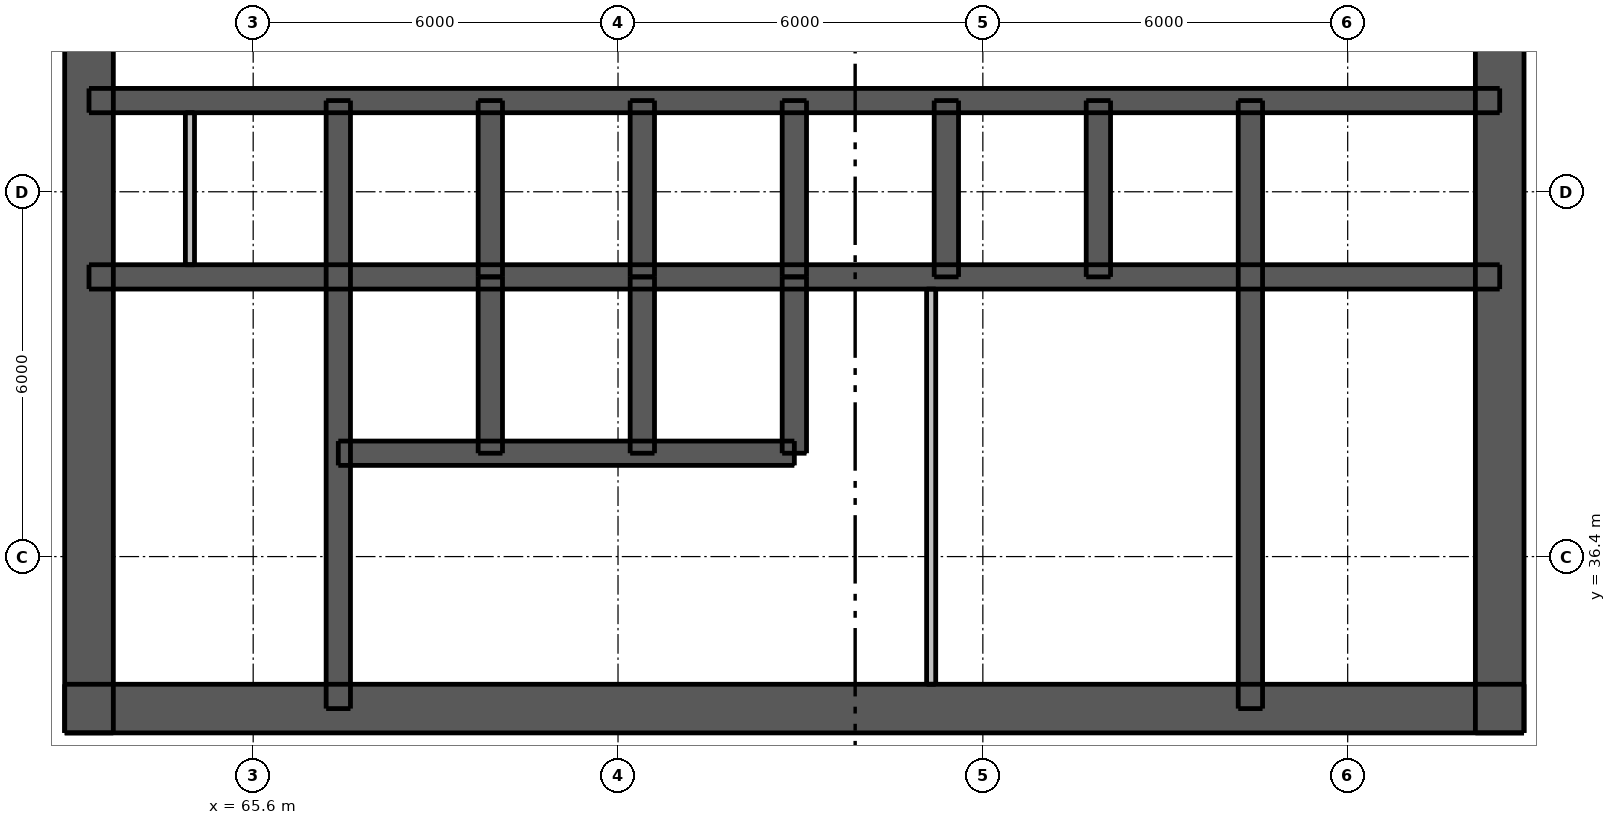
"""IFC4 building model, lengths in metres.
Left out: names, types, materials, properties, quantities, classifications, styles, units other than length and angle.
Written with IfcOpenShell. Run it as: python <this file> out.ifc"""

import sys

from ifc_helpers import new_model, si_unit, direction, frame, frame_2d, origin, place, context, subcontext, project, spatial, rectangle, extrude, element, fill, save


model = new_model("IFC4")
c1 = context("Model", 3, precision=1e-05, world=origin(), true_north=direction((0.0, 1.0)))
c2 = subcontext(c1, "Body", "Model", "MODEL_VIEW")
j1 = project(units=[si_unit("LENGTHUNIT", "METRE"), si_unit("PLANEANGLEUNIT", "RADIAN")], contexts=[c1])
p1 = place(None, origin())
s1 = spatial("IfcSite", under=j1, at=p1, CompositionType="ELEMENT")
p2 = place(p1, origin())
s2 = spatial("IfcBuilding", under=s1, at=p2, CompositionType="ELEMENT")
p3 = place(p2, frame((0.0, 0.0, 108.4)))
s3 = spatial("IfcBuildingStorey", under=s2, at=p3, CompositionType="ELEMENT", Elevation=108.4)
p4 = place(p3, frame((62.5, 33.9, 0.0), z_axis=(0.0, 0.0, 1.0), x_axis=(1.0, 0.0, 0.0)))
e1 = element("IfcWall", 1, at=p4, inside=s3, PredefinedType="SHEAR", context=c2, shape_type="SweptSolid", body=[
    extrude(rectangle(XDim=24.0, YDim=0.8, at=frame_2d((12.0, 0.0))), origin(), (0.0, 0.0, 1.0), 3.05),
])
p5 = place(p4, frame((2.0, 0.0, 0.0)))
e2 = element("IfcOpeningElement", 2, at=p5, cuts=e1, PredefinedType="OPENING", context=c2, shape_type="SweptSolid", body=[
    extrude(rectangle(XDim=1.1, YDim=2.1, at=frame_2d((0.55, 1.05))), frame((0.0, 0.41, 0.0), z_axis=(0.0, -1.0, 0.0), x_axis=(1.0, 0.0, 0.0)), (0.0, 0.0, 1.0), 0.82),
])
p6 = place(p4, frame((20.9, 0.0, 0.0)))
e3 = element("IfcOpeningElement", 3, at=p6, cuts=e1, PredefinedType="OPENING", context=c2, shape_type="SweptSolid", body=[
    extrude(rectangle(XDim=1.1, YDim=2.1, at=frame_2d((0.55, 1.05))), frame((0.0, 0.41, 0.0), z_axis=(0.0, -1.0, 0.0), x_axis=(1.0, 0.0, 0.0)), (0.0, 0.0, 1.0), 0.82),
])
p7 = place(p4, frame((8.0, 0.0, 0.0)))
e4 = element("IfcOpeningElement", 4, at=p7, cuts=e1, PredefinedType="OPENING", context=c2, shape_type="SweptSolid", body=[
    extrude(rectangle(XDim=1.1, YDim=2.1, at=frame_2d((0.55, 1.05))), frame((0.0, 0.41, 0.0), z_axis=(0.0, -1.0, 0.0), x_axis=(1.0, 0.0, 0.0)), (0.0, 0.0, 1.0), 0.82),
])
p8 = place(p4, frame((16.363, 0.0, 0.0)))
e5 = element("IfcOpeningElement", 5, at=p8, cuts=e1, PredefinedType="OPENING", context=c2, shape_type="SweptSolid", body=[
    extrude(rectangle(XDim=0.9, YDim=2.1, at=frame_2d((0.45, 1.05))), frame((0.0, 0.41, 0.0), z_axis=(0.0, -1.0, 0.0), x_axis=(1.0, 0.0, 0.0)), (0.0, 0.0, 1.0), 0.82),
])
p9 = place(p3, frame((62.9, 33.5, 0.0), z_axis=(0.0, 0.0, 1.0), x_axis=(0.0, 1.0, 0.0)))
e6 = element("IfcWall", 6, at=p9, inside=s3, PredefinedType="SHEAR", context=c2, shape_type="SweptSolid", body=[
    extrude(rectangle(XDim=24.0, YDim=0.8, at=frame_2d((12.0, 0.0))), origin(), (0.0, 0.0, 1.0), 3.05),
])
p10 = place(p9, frame((11.2, 0.0, 0.0)))
e7 = element("IfcOpeningElement", 7, at=p10, cuts=e6, PredefinedType="OPENING", context=c2, shape_type="SweptSolid", body=[
    extrude(rectangle(XDim=1.6, YDim=2.1, at=frame_2d((0.8, 1.05))), frame((0.0, 0.41, 0.0), z_axis=(0.0, -1.0, 0.0), x_axis=(1.0, 0.0, 0.0)), (0.0, 0.0, 1.0), 0.82),
])
p11 = place(p3, frame((86.1, 33.5, 0.0), z_axis=(0.0, 0.0, 1.0), x_axis=(0.0, 1.0, 0.0)))
e8 = element("IfcWall", 8, at=p11, inside=s3, PredefinedType="SHEAR", context=c2, shape_type="SweptSolid", body=[
    extrude(rectangle(XDim=24.0, YDim=0.8, at=frame_2d((12.0, 0.0))), origin(), (0.0, 0.0, 1.0), 3.05),
])
p12 = place(p11, frame((11.2, 0.0, 0.0)))
e9 = element("IfcOpeningElement", 9, at=p12, cuts=e8, PredefinedType="OPENING", context=c2, shape_type="SweptSolid", body=[
    extrude(rectangle(XDim=1.6, YDim=2.1, at=frame_2d((0.8, 1.05))), frame((0.0, 0.41, 0.0), z_axis=(0.0, -1.0, 0.0), x_axis=(1.0, 0.0, 0.0)), (0.0, 0.0, 1.0), 0.82),
])
p13 = place(p3, frame((62.9, 41.0, 0.0), z_axis=(0.0, 0.0, 1.0), x_axis=(1.0, 0.0, 0.0)))
e10 = element("IfcWall", 10, at=p13, inside=s3, PredefinedType="SHEAR", context=c2, shape_type="SweptSolid", body=[
    extrude(rectangle(XDim=23.2, YDim=0.4, at=frame_2d((11.6, 0.0))), origin(), (0.0, 0.0, 1.0), 3.05),
])
p14 = place(p3, frame((62.9, 43.9, 0.0), z_axis=(0.0, 0.0, 1.0), x_axis=(1.0, 0.0, 0.0)))
e11 = element("IfcWall", 11, at=p14, inside=s3, PredefinedType="SHEAR", context=c2, shape_type="SweptSolid", body=[
    extrude(rectangle(XDim=23.2, YDim=0.4, at=frame_2d((11.6, 0.0))), origin(), (0.0, 0.0, 1.0), 3.05),
])
p15 = place(p14, frame((0.63, 0.0, 0.0)))
e12 = element("IfcOpeningElement", 12, at=p15, cuts=e11, PredefinedType="OPENING", context=c2, shape_type="SweptSolid", body=[
    extrude(rectangle(XDim=0.8, YDim=2.1, at=frame_2d((0.4, 1.05))), frame((0.0, 0.21, 0.0), z_axis=(0.0, -1.0, 0.0), x_axis=(1.0, 0.0, 0.0)), (0.0, 0.0, 1.0), 0.42),
])
p16 = place(p14, frame((2.33, 0.0, 0.0)))
e13 = element("IfcOpeningElement", 13, at=p16, cuts=e11, PredefinedType="OPENING", context=c2, shape_type="SweptSolid", body=[
    extrude(rectangle(XDim=0.9, YDim=2.1, at=frame_2d((0.45, 1.05))), frame((0.0, 0.21, 0.0), z_axis=(0.0, -1.0, 0.0), x_axis=(1.0, 0.0, 0.0)), (0.0, 0.0, 1.0), 0.42),
])
p17 = place(p14, frame((20.6, 0.0, 0.0)))
e14 = element("IfcOpeningElement", 14, at=p17, cuts=e11, PredefinedType="OPENING", context=c2, shape_type="SweptSolid", body=[
    extrude(rectangle(XDim=0.9, YDim=2.1, at=frame_2d((0.45, 1.05))), frame((0.0, 0.21, 0.0), z_axis=(0.0, -1.0, 0.0), x_axis=(1.0, 0.0, 0.0)), (0.0, 0.0, 1.0), 0.42),
])
p18 = place(p14, frame((4.8, 0.0, 0.0)))
e15 = element("IfcOpeningElement", 15, at=p18, cuts=e11, PredefinedType="OPENING", context=c2, shape_type="SweptSolid", body=[
    extrude(rectangle(XDim=1.1, YDim=2.1, at=frame_2d((0.55, 1.05))), frame((0.0, 0.21, 0.0), z_axis=(0.0, -1.0, 0.0), x_axis=(1.0, 0.0, 0.0)), (0.0, 0.0, 1.0), 0.42),
])
p19 = place(p14, frame((7.3, 0.0, 0.0)))
e16 = element("IfcOpeningElement", 16, at=p19, cuts=e11, PredefinedType="OPENING", context=c2, shape_type="SweptSolid", body=[
    extrude(rectangle(XDim=1.1, YDim=2.1, at=frame_2d((0.55, 1.05))), frame((0.0, 0.21, 0.0), z_axis=(0.0, -1.0, 0.0), x_axis=(1.0, 0.0, 0.0)), (0.0, 0.0, 1.0), 0.42),
])
p20 = place(p14, frame((9.8, 0.0, 0.0)))
e17 = element("IfcOpeningElement", 17, at=p20, cuts=e11, PredefinedType="OPENING", context=c2, shape_type="SweptSolid", body=[
    extrude(rectangle(XDim=1.1, YDim=2.1, at=frame_2d((0.55, 1.05))), frame((0.0, 0.21, 0.0), z_axis=(0.0, -1.0, 0.0), x_axis=(1.0, 0.0, 0.0)), (0.0, 0.0, 1.0), 0.42),
])
p21 = place(p14, frame((12.3, 0.0, 0.0)))
e18 = element("IfcOpeningElement", 18, at=p21, cuts=e11, PredefinedType="OPENING", context=c2, shape_type="SweptSolid", body=[
    extrude(rectangle(XDim=1.1, YDim=2.1, at=frame_2d((0.55, 1.05))), frame((0.0, 0.21, 0.0), z_axis=(0.0, -1.0, 0.0), x_axis=(1.0, 0.0, 0.0)), (0.0, 0.0, 1.0), 0.42),
])
p22 = place(p14, frame((14.8, 0.0, 0.0)))
e19 = element("IfcOpeningElement", 19, at=p22, cuts=e11, PredefinedType="OPENING", context=c2, shape_type="SweptSolid", body=[
    extrude(rectangle(XDim=1.1, YDim=2.1, at=frame_2d((0.55, 1.05))), frame((0.0, 0.21, 0.0), z_axis=(0.0, -1.0, 0.0), x_axis=(1.0, 0.0, 0.0)), (0.0, 0.0, 1.0), 0.42),
])
p23 = place(p14, frame((17.3, 0.0, 0.0)))
e20 = element("IfcOpeningElement", 20, at=p23, cuts=e11, PredefinedType="OPENING", context=c2, shape_type="SweptSolid", body=[
    extrude(rectangle(XDim=1.1, YDim=2.1, at=frame_2d((0.55, 1.05))), frame((0.0, 0.21, 0.0), z_axis=(0.0, -1.0, 0.0), x_axis=(1.0, 0.0, 0.0)), (0.0, 0.0, 1.0), 0.42),
])
p24 = place(p3, frame((67.0, 33.9, 0.0), z_axis=(0.0, 0.0, 1.0), x_axis=(0.0, 1.0, 0.0)))
e21 = element("IfcWall", 21, at=p24, inside=s3, PredefinedType="SHEAR", context=c2, shape_type="SweptSolid", body=[
    extrude(rectangle(XDim=10.0, YDim=0.4, at=frame_2d((5.0, 0.0))), origin(), (0.0, 0.0, 1.0), 3.05),
])
p25 = place(p24, frame((0.6, 0.0, 0.0)))
e22 = element("IfcOpeningElement", 22, at=p25, cuts=e21, PredefinedType="OPENING", context=c2, shape_type="SweptSolid", body=[
    extrude(rectangle(XDim=1.1, YDim=2.1, at=frame_2d((0.55, 1.05))), frame((0.0, 0.21, 0.0), z_axis=(0.0, -1.0, 0.0), x_axis=(1.0, 0.0, 0.0)), (0.0, 0.0, 1.0), 0.42),
])
p26 = place(p3, frame((82.0, 33.9, 0.0), z_axis=(0.0, 0.0, 1.0), x_axis=(0.0, 1.0, 0.0)))
e23 = element("IfcWall", 23, at=p26, inside=s3, PredefinedType="SHEAR", context=c2, shape_type="SweptSolid", body=[
    extrude(rectangle(XDim=10.0, YDim=0.4, at=frame_2d((5.0, 0.0))), origin(), (0.0, 0.0, 1.0), 3.05),
])
for number, where, z_axis, x_axis in (
    (24, (69.5, 41.0, 0.0), (0.0, 0.0, 1.0), (0.0, 1.0, 0.0)),
    (25, (72.0, 41.0, 0.0), (0.0, 0.0, 1.0), (0.0, 1.0, 0.0)),
    (26, (74.5, 41.0, 0.0), (0.0, 0.0, 1.0), (0.0, 1.0, 0.0)),
    (27, (77.0, 41.0, 0.0), (0.0, 0.0, 1.0), (0.0, 1.0, 0.0)),
    (28, (79.5, 41.0, 0.0), (0.0, 0.0, 1.0), (0.0, 1.0, 0.0)),
):
    element("IfcWall", number, at=place(p3, frame(where, z_axis=z_axis, x_axis=x_axis)), inside=s3, PredefinedType="SHEAR", context=c2, shape_type="SweptSolid", body=[
        extrude(rectangle(XDim=2.9, YDim=0.4, at=frame_2d((1.45, 0.0))), origin(), (0.0, 0.0, 1.0), 3.05),
    ])
p27 = place(p3, frame((67.0, 38.1, 0.0), z_axis=(0.0, 0.0, 1.0), x_axis=(1.0, 0.0, 0.0)))
e29 = element("IfcWall", 29, at=p27, inside=s3, PredefinedType="SHEAR", context=c2, shape_type="SweptSolid", body=[
    extrude(rectangle(XDim=7.5, YDim=0.4, at=frame_2d((3.75, 0.0))), origin(), (0.0, 0.0, 1.0), 3.05),
])
p28 = place(p27, frame((0.7, 0.0, 0.0)))
e30 = element("IfcOpeningElement", 30, at=p28, cuts=e29, PredefinedType="OPENING", context=c2, shape_type="SweptSolid", body=[
    extrude(rectangle(XDim=1.1, YDim=2.1, at=frame_2d((0.55, 1.05))), frame((0.0, 0.21, 0.0), z_axis=(0.0, -1.0, 0.0), x_axis=(1.0, 0.0, 0.0)), (0.0, 0.0, 1.0), 0.42),
])
p29 = place(p27, frame((3.2, 0.0, 0.0)))
e31 = element("IfcOpeningElement", 31, at=p29, cuts=e29, PredefinedType="OPENING", context=c2, shape_type="SweptSolid", body=[
    extrude(rectangle(XDim=1.1, YDim=2.1, at=frame_2d((0.55, 1.05))), frame((0.0, 0.21, 0.0), z_axis=(0.0, -1.0, 0.0), x_axis=(1.0, 0.0, 0.0)), (0.0, 0.0, 1.0), 0.42),
])
p30 = place(p27, frame((5.65, 0.0, 0.0)))
e32 = element("IfcOpeningElement", 32, at=p30, cuts=e29, PredefinedType="OPENING", context=c2, shape_type="SweptSolid", body=[
    extrude(rectangle(XDim=1.2, YDim=2.1, at=frame_2d((0.6, 1.05))), frame((0.0, 0.21, 0.0), z_axis=(0.0, -1.0, 0.0), x_axis=(1.0, 0.0, 0.0)), (0.0, 0.0, 1.0), 0.42),
])
for number, where, z_axis, x_axis in (
    (33, (69.5, 38.1, 0.0), (0.0, 0.0, 1.0), (0.0, 1.0, 0.0)),
    (34, (72.0, 38.1, 0.0), (0.0, 0.0, 1.0), (0.0, 1.0, 0.0)),
    (35, (74.5, 38.1, 0.0), (0.0, 0.0, 1.0), (0.0, 1.0, 0.0)),
):
    element("IfcWall", number, at=place(p3, frame(where, z_axis=z_axis, x_axis=x_axis)), inside=s3, PredefinedType="SHEAR", context=c2, shape_type="SweptSolid", body=[
        extrude(rectangle(XDim=2.9, YDim=0.4, at=frame_2d((1.45, 0.0))), origin(), (0.0, 0.0, 1.0), 3.05),
    ])
p31 = place(p3, frame((76.75, 34.3, 0.0), z_axis=(0.0, 0.0, 1.0), x_axis=(0.0, 1.0, 0.0)))
e36 = element("IfcWall", 36, at=p31, inside=s3, PredefinedType="PLUMBINGWALL", context=c2, shape_type="SweptSolid", body=[
    extrude(rectangle(XDim=6.5, YDim=0.15, at=frame_2d((3.25, 0.0))), origin(), (0.0, 0.0, 1.0), 3.05),
])
p32 = place(p3, frame((64.56, 41.2, 0.0), z_axis=(0.0, 0.0, 1.0), x_axis=(0.0, 1.0, 0.0)))
e37 = element("IfcWall", 37, at=p32, inside=s3, PredefinedType="PLUMBINGWALL", context=c2, shape_type="SweptSolid", body=[
    extrude(rectangle(XDim=2.5, YDim=0.15, at=frame_2d((1.25, 0.0))), origin(), (0.0, 0.0, 1.0), 3.05),
])
p33 = place(p5, origin())
e38 = element("IfcDoor", 38, at=p33, inside=s3, OperationType="SINGLE_SWING_LEFT", PredefinedType="DOOR", context=c2, shape_type="SweptSolid", body=[
    extrude(rectangle(XDim=1.1, YDim=2.1, at=frame_2d((0.55, 1.05))), frame((0.0, 0.388, 0.0), z_axis=(0.0, -1.0, 0.0), x_axis=(1.0, 0.0, 0.0)), (0.0, 0.0, 1.0), 0.05),
])
fill(e2, e38)
p34 = place(p6, origin())
e39 = element("IfcDoor", 39, at=p34, inside=s3, OperationType="SINGLE_SWING_RIGHT", PredefinedType="DOOR", context=c2, shape_type="SweptSolid", body=[
    extrude(rectangle(XDim=1.1, YDim=2.1, at=frame_2d((0.55, 1.05))), frame((0.0, 0.388, 0.0), z_axis=(0.0, -1.0, 0.0), x_axis=(1.0, 0.0, 0.0)), (0.0, 0.0, 1.0), 0.05),
])
fill(e3, e39)
p35 = place(p7, origin())
e40 = element("IfcDoor", 40, at=p35, inside=s3, OperationType="SINGLE_SWING_LEFT", PredefinedType="DOOR", context=c2, shape_type="SweptSolid", body=[
    extrude(rectangle(XDim=1.1, YDim=2.1, at=frame_2d((0.55, 1.05))), frame((0.0, 0.388, 0.0), z_axis=(0.0, -1.0, 0.0), x_axis=(1.0, 0.0, 0.0)), (0.0, 0.0, 1.0), 0.05),
])
fill(e4, e40)
p36 = place(p25, origin())
e41 = element("IfcDoor", 41, at=p36, inside=s3, OperationType="SINGLE_SWING_RIGHT", PredefinedType="DOOR", context=c2, shape_type="SweptSolid", body=[
    extrude(rectangle(XDim=1.1, YDim=2.1, at=frame_2d((0.55, 1.05))), frame((0.0, -0.138, 0.0), z_axis=(0.0, -1.0, 0.0), x_axis=(1.0, 0.0, 0.0)), (0.0, 0.0, 1.0), 0.05),
])
fill(e22, e41)
p37 = place(p8, origin())
e42 = element("IfcDoor", 42, at=p37, inside=s3, OperationType="SINGLE_SWING_LEFT", PredefinedType="DOOR", context=c2, shape_type="SweptSolid", body=[
    extrude(rectangle(XDim=0.9, YDim=2.1, at=frame_2d((0.45, 1.05))), frame((0.0, 0.388, 0.0), z_axis=(0.0, -1.0, 0.0), x_axis=(1.0, 0.0, 0.0)), (0.0, 0.0, 1.0), 0.05),
])
fill(e5, e42)
p38 = place(p15, origin())
e43 = element("IfcDoor", 43, at=p38, inside=s3, OperationType="SINGLE_SWING_LEFT", PredefinedType="DOOR", context=c2, shape_type="SweptSolid", body=[
    extrude(rectangle(XDim=0.8, YDim=2.1, at=frame_2d((0.4, 1.05))), frame((0.0, -0.138, 0.0), z_axis=(0.0, -1.0, 0.0), x_axis=(1.0, 0.0, 0.0)), (0.0, 0.0, 1.0), 0.05),
])
fill(e12, e43)
p39 = place(p16, origin())
e44 = element("IfcDoor", 44, at=p39, inside=s3, OperationType="SINGLE_SWING_RIGHT", PredefinedType="DOOR", context=c2, shape_type="SweptSolid", body=[
    extrude(rectangle(XDim=0.9, YDim=2.1, at=frame_2d((0.45, 1.05))), frame((0.0, -0.138, 0.0), z_axis=(0.0, -1.0, 0.0), x_axis=(1.0, 0.0, 0.0)), (0.0, 0.0, 1.0), 0.05),
])
fill(e13, e44)
p40 = place(p17, origin())
e45 = element("IfcDoor", 45, at=p40, inside=s3, OperationType="SINGLE_SWING_LEFT", PredefinedType="DOOR", context=c2, shape_type="SweptSolid", body=[
    extrude(rectangle(XDim=0.9, YDim=2.1, at=frame_2d((0.45, 1.05))), frame((0.0, -0.138, 0.0), z_axis=(0.0, -1.0, 0.0), x_axis=(1.0, 0.0, 0.0)), (0.0, 0.0, 1.0), 0.05),
])
fill(e14, e45)
p41 = place(p18, origin())
e46 = element("IfcDoor", 46, at=p41, inside=s3, OperationType="DOUBLE_DOOR_SLIDING", PredefinedType="DOOR", context=c2, shape_type="SweptSolid", body=[
    extrude(rectangle(XDim=1.1, YDim=2.1, at=frame_2d((0.55, 1.05))), frame((0.0, 0.025, 0.0), z_axis=(0.0, -1.0, 0.0), x_axis=(1.0, 0.0, 0.0)), (0.0, 0.0, 1.0), 0.05),
])
fill(e15, e46)
p42 = place(p19, origin())
e47 = element("IfcDoor", 47, at=p42, inside=s3, OperationType="DOUBLE_DOOR_SLIDING", PredefinedType="DOOR", context=c2, shape_type="SweptSolid", body=[
    extrude(rectangle(XDim=1.1, YDim=2.1, at=frame_2d((0.55, 1.05))), frame((0.0, 0.025, 0.0), z_axis=(0.0, -1.0, 0.0), x_axis=(1.0, 0.0, 0.0)), (0.0, 0.0, 1.0), 0.05),
])
fill(e16, e47)
p43 = place(p20, origin())
e48 = element("IfcDoor", 48, at=p43, inside=s3, OperationType="DOUBLE_DOOR_SLIDING", PredefinedType="DOOR", context=c2, shape_type="SweptSolid", body=[
    extrude(rectangle(XDim=1.1, YDim=2.1, at=frame_2d((0.55, 1.05))), frame((0.0, 0.025, 0.0), z_axis=(0.0, -1.0, 0.0), x_axis=(1.0, 0.0, 0.0)), (0.0, 0.0, 1.0), 0.05),
])
fill(e17, e48)
p44 = place(p21, origin())
e49 = element("IfcDoor", 49, at=p44, inside=s3, OperationType="DOUBLE_DOOR_SLIDING", PredefinedType="DOOR", context=c2, shape_type="SweptSolid", body=[
    extrude(rectangle(XDim=1.1, YDim=2.1, at=frame_2d((0.55, 1.05))), frame((0.0, 0.025, 0.0), z_axis=(0.0, -1.0, 0.0), x_axis=(1.0, 0.0, 0.0)), (0.0, 0.0, 1.0), 0.05),
])
fill(e18, e49)
p45 = place(p22, origin())
e50 = element("IfcDoor", 50, at=p45, inside=s3, OperationType="DOUBLE_DOOR_SLIDING", PredefinedType="DOOR", context=c2, shape_type="SweptSolid", body=[
    extrude(rectangle(XDim=1.1, YDim=2.1, at=frame_2d((0.55, 1.05))), frame((0.0, 0.025, 0.0), z_axis=(0.0, -1.0, 0.0), x_axis=(1.0, 0.0, 0.0)), (0.0, 0.0, 1.0), 0.05),
])
fill(e19, e50)
p46 = place(p23, origin())
e51 = element("IfcDoor", 51, at=p46, inside=s3, OperationType="DOUBLE_DOOR_SLIDING", PredefinedType="DOOR", context=c2, shape_type="SweptSolid", body=[
    extrude(rectangle(XDim=1.1, YDim=2.1, at=frame_2d((0.55, 1.05))), frame((0.0, 0.025, 0.0), z_axis=(0.0, -1.0, 0.0), x_axis=(1.0, 0.0, 0.0)), (0.0, 0.0, 1.0), 0.05),
])
fill(e20, e51)
p47 = place(p28, origin())
e52 = element("IfcDoor", 52, at=p47, inside=s3, OperationType="DOUBLE_DOOR_SLIDING", PredefinedType="DOOR", context=c2, shape_type="SweptSolid", body=[
    extrude(rectangle(XDim=1.1, YDim=2.1, at=frame_2d((0.55, 1.05))), frame((0.0, 0.025, 0.0), z_axis=(0.0, -1.0, 0.0), x_axis=(1.0, 0.0, 0.0)), (0.0, 0.0, 1.0), 0.05),
])
fill(e30, e52)
p48 = place(p29, origin())
e53 = element("IfcDoor", 53, at=p48, inside=s3, OperationType="DOUBLE_DOOR_SLIDING", PredefinedType="DOOR", context=c2, shape_type="SweptSolid", body=[
    extrude(rectangle(XDim=1.1, YDim=2.1, at=frame_2d((0.55, 1.05))), frame((0.0, 0.025, 0.0), z_axis=(0.0, -1.0, 0.0), x_axis=(1.0, 0.0, 0.0)), (0.0, 0.0, 1.0), 0.05),
])
fill(e31, e53)
p49 = place(p30, origin())
e54 = element("IfcDoor", 54, at=p49, inside=s3, OperationType="DOUBLE_DOOR_SLIDING", PredefinedType="DOOR", context=c2, shape_type="SweptSolid", body=[
    extrude(rectangle(XDim=1.2, YDim=2.1, at=frame_2d((0.6, 1.05))), frame((0.0, 0.025, 0.0), z_axis=(0.0, -1.0, 0.0), x_axis=(1.0, 0.0, 0.0)), (0.0, 0.0, 1.0), 0.05),
])
fill(e32, e54)
save(model, sys.argv[1])
